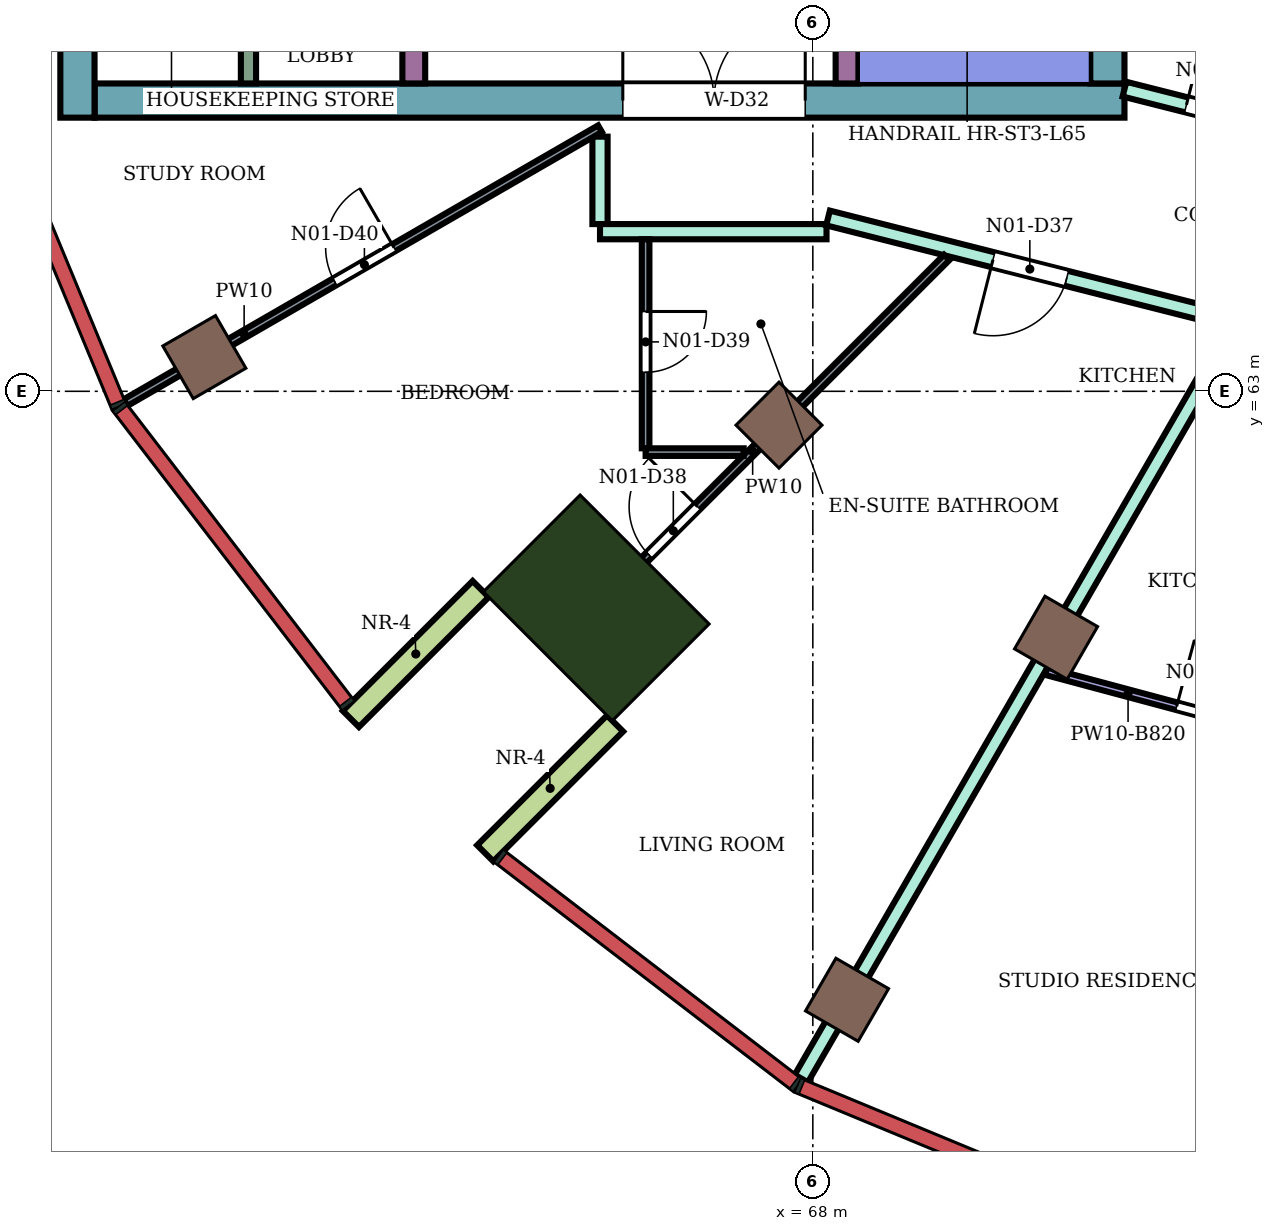
"""IFC4 building model, lengths in metres.
Left out: names, types, materials, properties, quantities, classifications, styles, units other than length and angle.
Written with IfcOpenShell. Run it as: python <this file> out.ifc"""

import sys

from ifc_helpers import new_model, si_unit, direction, frame, frame_2d, origin, origin_2d, place, context, subcontext, project, spatial, rectangle, extrude, element, fill, save


model = new_model("IFC4")
c1 = context("Model", 3, precision=1e-05, world=origin(), true_north=direction((0.0, 1.0)))
c2 = subcontext(c1, "Body", "Model", "MODEL_VIEW")
j1 = project(units=[si_unit("LENGTHUNIT", "METRE"), si_unit("PLANEANGLEUNIT", "RADIAN")], contexts=[c1])
p1 = place(None, origin())
s1 = spatial("IfcSite", under=j1, at=p1, CompositionType="ELEMENT")
p2 = place(p1, origin())
s2 = spatial("IfcBuilding", under=s1, at=p2, CompositionType="ELEMENT")
p3 = place(p2, frame((0.0, 0.0, 284.1)))
s3 = spatial("IfcBuildingStorey", under=s2, at=p3, CompositionType="ELEMENT", Elevation=284.1)
for number, where, z_axis, x_axis in (
    (1, (59.995, 63.45, 0.0), (0.0, 0.0, 1.0), (-0.866, -0.5, 0.0)),
    (2, (68.45, 54.995, 0.0), (0.0, 0.0, 1.0), (-0.5, -0.866, 0.0)),
    (3, (67.555, 62.555, 0.0), (0.0, 0.0, 1.0), (-0.707, -0.707, 0.0)),
    (4, (71.2, 59.758, 0.0), (0.0, 0.0, 1.0), (-0.5, -0.866, 0.0)),
):
    element("IfcColumn", number, at=place(p3, frame(where, z_axis=z_axis, x_axis=x_axis)), inside=s3, PredefinedType="COLUMN", context=c2, shape_type="SweptSolid", body=[
        extrude(rectangle(XDim=0.8, YDim=0.8, at=origin_2d()), origin(), (0.0, 0.0, 1.0), 4.2),
    ])
p4 = place(p3, frame((65.151, 60.151, 0.0), z_axis=(0.0, 0.0, 1.0), x_axis=(-0.707106781187, -0.707106781187, 0.0)))
e5 = element("IfcColumn", 5, at=p4, inside=s3, PredefinedType="COLUMN", context=c2, shape_type="SweptSolid", body=[
    extrude(rectangle(XDim=1.8, YDim=2.4, at=origin_2d()), origin(), (0.0, 0.0, 1.0), 4.2),
])
p5 = place(p3, frame((72.1, 66.825, 0.0), z_axis=(0.0, 0.0, 1.0), x_axis=(-1.0, 0.0, 0.0)))
e6 = element("IfcWall", 6, at=p5, inside=s3, PredefinedType="SHEAR", context=c2, shape_type="SweptSolid", body=[
    extrude(rectangle(XDim=13.55, YDim=0.45, at=frame_2d((6.775, 0.0))), origin(), (0.0, 0.0, 1.0), 3.88),
])
p6 = place(p5, frame((4.2, 0.0, 0.0)))
e7 = element("IfcOpeningElement", 7, at=p6, cuts=e6, PredefinedType="OPENING", context=c2, shape_type="SweptSolid", body=[
    extrude(rectangle(XDim=2.4, YDim=2.4, at=frame_2d((1.2, 1.2))), frame((0.0, 0.235, 0.0), z_axis=(0.0, -1.0, 0.0), x_axis=(1.0, 0.0, 0.0)), (0.0, 0.0, 1.0), 0.47),
])
p7 = place(p3, frame((71.875, 75.0, 0.0), z_axis=(0.0, 0.0, 1.0), x_axis=(0.0, -1.0, 0.0)))
e8 = element("IfcWall", 8, at=p7, inside=s3, PredefinedType="SHEAR", context=c2, shape_type="SweptSolid", body=[
    extrude(rectangle(XDim=7.95, YDim=0.45, at=frame_2d((3.975, 0.0))), origin(), (0.0, 0.0, 1.0), 3.88),
])
p8 = place(p3, frame((58.325, 83.4, 0.0), z_axis=(0.0, 0.0, 1.0), x_axis=(0.0, -1.0, 0.0)))
e9 = element("IfcWall", 9, at=p8, inside=s3, PredefinedType="SHEAR", context=c2, shape_type="SweptSolid", body=[
    extrude(rectangle(XDim=16.8, YDim=0.45, at=frame_2d((8.4, 0.0))), origin(), (0.0, 0.0, 1.0), 3.88),
])
p9 = place(p3, frame((68.45, 75.0, 0.0), z_axis=(0.0, 0.0, 1.0), x_axis=(0.0, -1.0, 0.0)))
e10 = element("IfcWall", 10, at=p9, inside=s3, PredefinedType="SHEAR", context=c2, shape_type="SweptSolid", body=[
    extrude(rectangle(XDim=7.95, YDim=0.3, at=frame_2d((3.975, 0.0))), origin(), (0.0, 0.0, 1.0), 3.88),
])
p10 = place(p9, frame((1.85, 0.0, 0.0)))
e11 = element("IfcOpeningElement", 11, at=p10, cuts=e10, PredefinedType="OPENING", context=c2, shape_type="SweptSolid", body=[
    extrude(rectangle(XDim=0.9, YDim=2.1, at=frame_2d((0.45, 1.05))), frame((0.0, 0.16, 0.0), z_axis=(0.0, -1.0, 0.0), x_axis=(1.0, 0.0, 0.0)), (0.0, 0.0, 1.0), 0.32),
])
p11 = place(p3, frame((62.75, 71.25, 0.0), z_axis=(0.0, 0.0, 1.0), x_axis=(0.0, -1.0, 0.0)))
e12 = element("IfcWall", 12, at=p11, inside=s3, PredefinedType="SHEAR", context=c2, shape_type="SweptSolid", body=[
    extrude(rectangle(XDim=4.2, YDim=0.3, at=frame_2d((2.1, 0.0))), origin(), (0.0, 0.0, 1.0), 3.88),
])
for number, where, z_axis, x_axis in (
    (13, (63.63, 60.398, 0.0), (0.0, 0.0, 1.0), (-0.707, -0.707, 0.0)),
    (14, (65.398, 58.63, 0.0), (0.0, 0.0, 1.0), (-0.707, -0.707, 0.0)),
):
    element("IfcWall", number, at=place(p3, frame(where, z_axis=z_axis, x_axis=x_axis)), inside=s3, PredefinedType="NOTDEFINED", context=c2, shape_type="SweptSolid", body=[
        extrude(rectangle(XDim=2.416, YDim=0.3, at=frame_2d((1.208, 0.0))), origin(), (0.0, 0.0, 1.0), 4.2),
    ])
p12 = place(p3, frame((65.2, 65.2, 0.0), z_axis=(0.0, 0.0, 1.0), x_axis=(0.0, 1.0, 0.0)))
e15 = element("IfcWall", 15, at=p12, inside=s3, PredefinedType="PARTITIONING", context=c2, shape_type="SweptSolid", body=[
    extrude(rectangle(XDim=1.15, YDim=0.2, at=frame_2d((0.575, 0.0))), origin(), (0.0, 0.0, 1.0), 3.75),
])
p13 = place(p3, frame((65.2, 65.1, 0.0), z_axis=(0.0, 0.0, 1.0), x_axis=(1.0, 0.0, 0.0)))
e16 = element("IfcWall", 16, at=p13, inside=s3, PredefinedType="PARTITIONING", context=c2, shape_type="SweptSolid", body=[
    extrude(rectangle(XDim=2.98, YDim=0.2, at=frame_2d((1.49, 0.0))), origin(), (0.0, 0.0, 1.0), 3.75),
])
p14 = place(p3, frame((67.848, 53.959, 0.0), z_axis=(0.0, 0.0, 1.0), x_axis=(0.500121565392, 0.865955206595, 0.0)))
e17 = element("IfcWall", 17, at=p14, inside=s3, PredefinedType="PARTITIONING", context=c2, shape_type="SweptSolid", body=[
    extrude(rectangle(XDim=11.366, YDim=0.2, at=frame_2d((5.683, 0.0))), origin(), (0.0, 0.0, 1.0), 3.75),
])
p15 = place(p3, frame((68.2, 65.28, 0.0), z_axis=(0.0, 0.0, 1.0), x_axis=(0.969440802773, -0.24532535523, 0.0)))
e18 = element("IfcWall", 18, at=p15, inside=s3, PredefinedType="PARTITIONING", context=c2, shape_type="SweptSolid", body=[
    extrude(rectangle(XDim=5.928, YDim=0.2, at=frame_2d((2.964, 0.0))), origin(), (0.0, 0.0, 1.0), 3.75),
])
p16 = place(p15, frame((2.239, 0.0, 0.0)))
e19 = element("IfcOpeningElement", 19, at=p16, cuts=e18, PredefinedType="OPENING", context=c2, shape_type="SweptSolid", body=[
    extrude(rectangle(XDim=1.0, YDim=2.1, at=frame_2d((0.5, 1.05))), frame((0.0, 0.11, 0.0), z_axis=(0.0, -1.0, 0.0), x_axis=(1.0, 0.0, 0.0)), (0.0, 0.0, 1.0), 0.22),
])
p17 = place(p3, frame((72.1, 66.975, 0.0), z_axis=(0.0, 0.0, 1.0), x_axis=(0.969471314457, -0.245204752086, 0.0)))
e20 = element("IfcWall", 20, at=p17, inside=s3, PredefinedType="PARTITIONING", context=c2, shape_type="SweptSolid", body=[
    extrude(rectangle(XDim=2.582, YDim=0.2, at=frame_2d((1.291, 0.0))), origin(), (0.0, 0.0, 1.0), 3.75),
])
p18 = place(p17, frame((0.841, 0.0, 0.0)))
e21 = element("IfcOpeningElement", 21, at=p18, cuts=e20, PredefinedType="OPENING", context=c2, shape_type="SweptSolid", body=[
    extrude(rectangle(XDim=0.9, YDim=2.1, at=frame_2d((0.45, 1.05))), frame((0.0, 0.11, 0.0), z_axis=(0.0, -1.0, 0.0), x_axis=(1.0, 0.0, 0.0)), (0.0, 0.0, 1.0), 0.22),
])
p19 = place(p3, frame((58.958, 62.851, 0.0), z_axis=(0.0, 0.0, 1.0), x_axis=(0.866044015472, 0.499967762227, 0.0)))
e22 = element("IfcWall", 22, at=p19, inside=s3, PredefinedType="PARTITIONING", context=c2, shape_type="SweptSolid", body=[
    extrude(rectangle(XDim=7.208, YDim=0.1, at=frame_2d((3.604, 0.0))), origin(), (0.0, 0.0, 1.0), 3.75),
])
p20 = place(p19, frame((3.179, 0.0, 0.0)))
e23 = element("IfcOpeningElement", 23, at=p20, cuts=e22, PredefinedType="OPENING", context=c2, shape_type="SweptSolid", body=[
    extrude(rectangle(XDim=0.9, YDim=2.1, at=frame_2d((0.45, 1.05))), frame((0.0, 0.06, 0.0), z_axis=(0.0, -1.0, 0.0), x_axis=(1.0, 0.0, 0.0)), (0.0, 0.0, 1.0), 0.12),
])
p21 = place(p3, frame((64.656, 59.656, 0.0), z_axis=(0.0, 0.0, 1.0), x_axis=(0.707106781187, 0.707106781187, 0.0)))
e24 = element("IfcWall", 24, at=p21, inside=s3, PredefinedType="PARTITIONING", context=c2, shape_type="SweptSolid", body=[
    extrude(rectangle(XDim=7.22, YDim=0.1, at=frame_2d((3.61, 0.0))), origin(), (0.0, 0.0, 1.0), 3.75),
])
p22 = place(p21, frame((1.684, 0.0, 0.0)))
e25 = element("IfcOpeningElement", 25, at=p22, cuts=e24, PredefinedType="OPENING", context=c2, shape_type="SweptSolid", body=[
    extrude(rectangle(XDim=0.9, YDim=2.1, at=frame_2d((0.45, 1.05))), frame((0.0, 0.06, 0.0), z_axis=(0.0, -1.0, 0.0), x_axis=(1.0, 0.0, 0.0)), (0.0, 0.0, 1.0), 0.12),
])
p23 = place(p3, frame((65.8, 62.25, 0.0), z_axis=(0.0, 0.0, 1.0), x_axis=(0.0, 1.0, 0.0)))
e26 = element("IfcWall", 26, at=p23, inside=s3, PredefinedType="PARTITIONING", context=c2, shape_type="SweptSolid", body=[
    extrude(rectangle(XDim=2.75, YDim=0.1, at=frame_2d((1.375, 0.0))), origin(), (0.0, 0.0, 1.0), 3.75),
])
p24 = place(p23, frame((1.0, 0.0, 0.0)))
e27 = element("IfcOpeningElement", 27, at=p24, cuts=e26, PredefinedType="OPENING", context=c2, shape_type="SweptSolid", body=[
    extrude(rectangle(XDim=0.8, YDim=2.1, at=frame_2d((0.4, 1.05))), frame((0.0, 0.06, 0.0), z_axis=(0.0, -1.0, 0.0), x_axis=(1.0, 0.0, 0.0)), (0.0, 0.0, 1.0), 0.12),
])
p25 = place(p3, frame((65.8, 62.2, 0.0), z_axis=(0.0, 0.0, 1.0), x_axis=(1.0, 0.0, 0.0)))
e28 = element("IfcWall", 28, at=p25, inside=s3, PredefinedType="PARTITIONING", context=c2, shape_type="SweptSolid", body=[
    extrude(rectangle(XDim=1.29, YDim=0.1, at=frame_2d((0.645, 0.0))), origin(), (0.0, 0.0, 1.0), 3.75),
])
p26 = place(p3, frame((71.068, 59.317, 0.0), z_axis=(0.0, 0.0, 1.0), x_axis=(0.965923173799, -0.258828944127, 0.0)))
e29 = element("IfcWall", 29, at=p26, inside=s3, PredefinedType="PARTITIONING", context=c2, shape_type="SweptSolid", body=[
    extrude(rectangle(XDim=4.468, YDim=0.1, at=frame_2d((2.234, 0.0))), origin(), (0.0, 0.0, 1.0), 3.38),
])
p27 = place(p26, frame((1.779, 0.0, 0.0)))
e30 = element("IfcOpeningElement", 30, at=p27, cuts=e29, PredefinedType="OPENING", context=c2, shape_type="SweptSolid", body=[
    extrude(rectangle(XDim=0.9, YDim=2.1, at=frame_2d((0.45, 1.05))), frame((0.0, 0.06, 0.0), z_axis=(0.0, -1.0, 0.0), x_axis=(1.0, 0.0, 0.0)), (0.0, 0.0, 1.0), 0.12),
])
p28 = place(p3, frame((60.575, 70.95, 0.0), z_axis=(0.0, 0.0, 1.0), x_axis=(0.0, -1.0, 0.0)))
e31 = element("IfcWall", 31, at=p28, inside=s3, PredefinedType="PARTITIONING", context=c2, shape_type="SweptSolid", body=[
    extrude(rectangle(XDim=3.9, YDim=0.2, at=frame_2d((1.95, 0.0))), origin(), (0.0, 0.0, 1.0), 3.88),
])
p29 = place(p27, origin())
e32 = element("IfcDoor", 32, at=p29, inside=s3, OperationType="SINGLE_SWING_LEFT", PredefinedType="DOOR", context=c2, shape_type="SweptSolid", body=[
    extrude(rectangle(XDim=0.9, YDim=2.1, at=frame_2d((0.45, 1.05))), frame((0.0, 0.025, 0.0), z_axis=(0.0, -1.0, 0.0), x_axis=(1.0, 0.0, 0.0)), (0.0, 0.0, 1.0), 0.05),
])
fill(e30, e32)
p30 = place(p16, frame((1.0, 0.0, 0.0), z_axis=(0.0, 0.0, 1.0), x_axis=(-1.0, 0.0, 0.0)))
e33 = element("IfcDoor", 33, at=p30, inside=s3, OperationType="SINGLE_SWING_RIGHT", PredefinedType="DOOR", context=c2, shape_type="SweptSolid", body=[
    extrude(rectangle(XDim=1.0, YDim=2.1, at=frame_2d((0.5, 1.05))), frame((0.0, 0.025, 0.0), z_axis=(0.0, -1.0, 0.0), x_axis=(1.0, 0.0, 0.0)), (0.0, 0.0, 1.0), 0.05),
])
fill(e19, e33)
p31 = place(p22, origin())
e34 = element("IfcDoor", 34, at=p31, inside=s3, OperationType="SINGLE_SWING_RIGHT", PredefinedType="DOOR", context=c2, shape_type="SweptSolid", body=[
    extrude(rectangle(XDim=0.9, YDim=2.1, at=frame_2d((0.45, 1.05))), frame((0.0, 0.025, 0.0), z_axis=(0.0, -1.0, 0.0), x_axis=(1.0, 0.0, 0.0)), (0.0, 0.0, 1.0), 0.05),
])
fill(e25, e34)
p32 = place(p24, frame((0.8, 0.0, 0.0), z_axis=(0.0, 0.0, 1.0), x_axis=(-1.0, 0.0, 0.0)))
e35 = element("IfcDoor", 35, at=p32, inside=s3, OperationType="SINGLE_SWING_LEFT", PredefinedType="DOOR", context=c2, shape_type="SweptSolid", body=[
    extrude(rectangle(XDim=0.8, YDim=2.1, at=frame_2d((0.4, 1.05))), frame((0.0, 0.025, 0.0), z_axis=(0.0, -1.0, 0.0), x_axis=(1.0, 0.0, 0.0)), (0.0, 0.0, 1.0), 0.05),
])
fill(e27, e35)
p33 = place(p20, origin())
e36 = element("IfcDoor", 36, at=p33, inside=s3, OperationType="SINGLE_SWING_RIGHT", PredefinedType="DOOR", context=c2, shape_type="SweptSolid", body=[
    extrude(rectangle(XDim=0.9, YDim=2.1, at=frame_2d((0.45, 1.05))), frame((0.0, 0.025, 0.0), z_axis=(0.0, -1.0, 0.0), x_axis=(1.0, 0.0, 0.0)), (0.0, 0.0, 1.0), 0.05),
])
fill(e23, e36)
p34 = place(p18, origin())
e37 = element("IfcDoor", 37, at=p34, inside=s3, OperationType="SINGLE_SWING_LEFT", PredefinedType="DOOR", context=c2, shape_type="SweptSolid", body=[
    extrude(rectangle(XDim=0.9, YDim=2.1, at=frame_2d((0.45, 1.05))), frame((0.0, 0.025, 0.0), z_axis=(0.0, -1.0, 0.0), x_axis=(1.0, 0.0, 0.0)), (0.0, 0.0, 1.0), 0.05),
])
fill(e21, e37)
p35 = place(p6, frame((2.4, 0.0, 0.0), z_axis=(0.0, 0.0, 1.0), x_axis=(-1.0, 0.0, 0.0)))
e38 = element("IfcDoor", 38, at=p35, inside=s3, OperationType="DOUBLE_DOOR_SINGLE_SWING", PredefinedType="DOOR", context=c2, shape_type="SweptSolid", body=[
    extrude(rectangle(XDim=2.4, YDim=2.4, at=frame_2d((1.2, 1.2))), frame((0.0, 0.025, 0.0), z_axis=(0.0, -1.0, 0.0), x_axis=(1.0, 0.0, 0.0)), (0.0, 0.0, 1.0), 0.05),
])
fill(e7, e38)
save(model, sys.argv[1])
